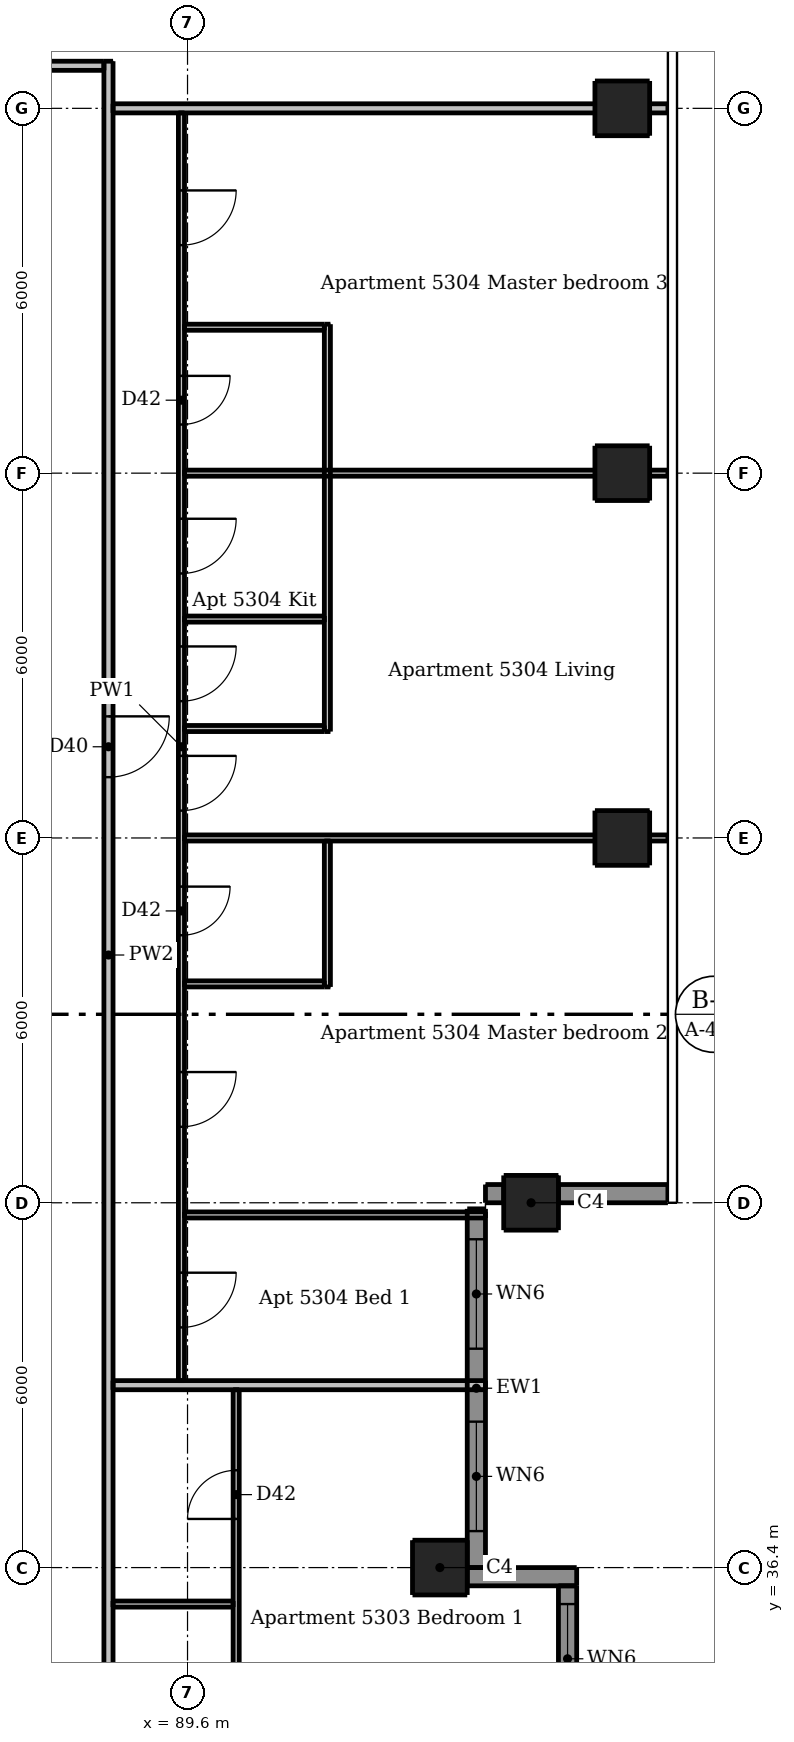
"""IFC4 building model, lengths in metres.
Left out: names, types, materials, properties, quantities, classifications, styles, units other than length and angle.
Written with IfcOpenShell. Run it as: python <this file> out.ifc"""

import sys

from ifc_helpers import new_model, si_unit, direction, frame, frame_2d, origin, origin_2d, place, context, subcontext, project, spatial, rectangle, extrude, element, fill, save


model = new_model("IFC4")
c1 = context("Model", 3, precision=1e-05, world=origin(), true_north=direction((0.0, 1.0)))
c2 = subcontext(c1, "Body", "Model", "MODEL_VIEW")
j1 = project(units=[si_unit("LENGTHUNIT", "METRE"), si_unit("PLANEANGLEUNIT", "RADIAN")], contexts=[c1])
p1 = place(None, origin())
s1 = spatial("IfcSite", under=j1, at=p1, CompositionType="ELEMENT")
p2 = place(p1, origin())
s2 = spatial("IfcBuilding", under=s1, at=p2, CompositionType="ELEMENT")
p3 = place(p2, frame((0.0, 0.0, 200.2)))
s3 = spatial("IfcBuildingStorey", under=s2, at=p3, CompositionType="ELEMENT", Elevation=200.2)
for number, where, z_axis, x_axis in (
    (1, (93.75, 36.4, 0.0), (0.0, 0.0, 1.0), (1.0, 0.0, 0.0)),
    (2, (95.25, 42.4, 0.0), (0.0, 0.0, 1.0), (1.0, 0.0, 0.0)),
    (3, (96.75, 48.4, 0.0), (0.0, 0.0, 1.0), (1.0, 0.0, 0.0)),
    (4, (96.75, 54.4, 0.0), (0.0, 0.0, 1.0), (1.0, 0.0, 0.0)),
    (5, (96.75, 60.4, 0.0), (0.0, 0.0, 1.0), (1.0, 0.0, 0.0)),
):
    element("IfcColumn", number, at=place(p3, frame(where, z_axis=z_axis, x_axis=x_axis)), inside=s3, PredefinedType="COLUMN", context=c2, shape_type="SweptSolid", body=[
        extrude(rectangle(XDim=0.9, YDim=0.9, at=origin_2d()), origin(), (0.0, 0.0, 1.0), 3.05),
    ])
p4 = place(p3, frame((96.0, 36.25, 0.0), z_axis=(0.0, 0.0, 1.0), x_axis=(-1.0, 0.0, 0.0)))
e6 = element("IfcWall", 6, at=p4, inside=s3, PredefinedType="SOLIDWALL", context=c2, shape_type="SweptSolid", body=[
    extrude(rectangle(XDim=1.8, YDim=0.3, at=frame_2d((0.9, 0.0))), origin(), (0.0, 0.0, 1.0), 3.05),
])
p5 = place(p3, frame((94.5, 42.55, 0.0), z_axis=(0.0, 0.0, 1.0), x_axis=(1.0, 0.0, 0.0)))
e7 = element("IfcWall", 7, at=p5, inside=s3, PredefinedType="SOLIDWALL", context=c2, shape_type="SweptSolid", body=[
    extrude(rectangle(XDim=0.3, YDim=0.3, at=frame_2d((0.15, 0.0))), origin(), (0.0, 0.0, 1.0), 3.05),
])
p6 = place(p3, frame((95.7, 42.55, 0.0), z_axis=(0.0, 0.0, 1.0), x_axis=(1.0, 0.0, 0.0)))
e8 = element("IfcWall", 8, at=p6, inside=s3, PredefinedType="SOLIDWALL", context=c2, shape_type="SweptSolid", body=[
    extrude(rectangle(XDim=1.8, YDim=0.3, at=frame_2d((0.9, 0.0))), origin(), (0.0, 0.0, 1.0), 3.05),
])
p7 = place(p3, frame((95.85, 30.1, 0.0), z_axis=(0.0, 0.0, 1.0), x_axis=(0.0, 1.0, 0.0)))
e9 = element("IfcWall", 9, at=p7, inside=s3, PredefinedType="SOLIDWALL", context=c2, shape_type="SweptSolid", body=[
    extrude(rectangle(XDim=6.0, YDim=0.3, at=frame_2d((3.0, 0.0))), origin(), (0.0, 0.0, 1.0), 3.05),
])
p8 = place(p7, frame((0.9, 0.0, 0.15)))
e10 = element("IfcOpeningElement", 10, at=p8, cuts=e9, PredefinedType="OPENING", context=c2, shape_type="SweptSolid", body=[
    extrude(rectangle(XDim=1.8, YDim=2.1, at=frame_2d((0.9, 1.05))), frame((0.0, 0.16, 0.0), z_axis=(0.0, -1.0, 0.0), x_axis=(1.0, 0.0, 0.0)), (0.0, 0.0, 1.0), 0.32),
])
p9 = place(p7, frame((3.9, 0.0, 0.15)))
e11 = element("IfcOpeningElement", 11, at=p9, cuts=e9, PredefinedType="OPENING", context=c2, shape_type="SweptSolid", body=[
    extrude(rectangle(XDim=1.8, YDim=2.1, at=frame_2d((0.9, 1.05))), frame((0.0, 0.16, 0.0), z_axis=(0.0, -1.0, 0.0), x_axis=(1.0, 0.0, 0.0)), (0.0, 0.0, 1.0), 0.32),
])
p10 = place(p3, frame((94.35, 36.4, 0.0), z_axis=(0.0, 0.0, 1.0), x_axis=(0.0, 1.0, 0.0)))
e12 = element("IfcWall", 12, at=p10, inside=s3, PredefinedType="SOLIDWALL", context=c2, shape_type="SweptSolid", body=[
    extrude(rectangle(XDim=5.9, YDim=0.3, at=frame_2d((2.95, 0.0))), origin(), (0.0, 0.0, 1.0), 3.05),
])
p11 = place(p10, frame((0.6, 0.0, 0.15)))
e13 = element("IfcOpeningElement", 13, at=p11, cuts=e12, PredefinedType="OPENING", context=c2, shape_type="SweptSolid", body=[
    extrude(rectangle(XDim=1.8, YDim=2.1, at=frame_2d((0.9, 1.05))), frame((0.0, 0.16, 0.0), z_axis=(0.0, -1.0, 0.0), x_axis=(1.0, 0.0, 0.0)), (0.0, 0.0, 1.0), 0.32),
])
p12 = place(p10, frame((3.6, 0.0, 0.15)))
e14 = element("IfcOpeningElement", 14, at=p12, cuts=e12, PredefinedType="OPENING", context=c2, shape_type="SweptSolid", body=[
    extrude(rectangle(XDim=1.8, YDim=2.1, at=frame_2d((0.9, 1.05))), frame((0.0, 0.16, 0.0), z_axis=(0.0, -1.0, 0.0), x_axis=(1.0, 0.0, 0.0)), (0.0, 0.0, 1.0), 0.32),
])
p13 = place(p3, frame((89.5, 60.325, 0.0), z_axis=(0.0, 0.0, 1.0), x_axis=(0.0, -1.0, 0.0)))
e15 = element("IfcWall", 15, at=p13, inside=s3, PredefinedType="PARTITIONING", context=c2, shape_type="SweptSolid", body=[
    extrude(rectangle(XDim=20.85, YDim=0.1, at=frame_2d((10.425, 0.0))), origin(), (0.0, 0.0, 1.0), 2.51),
])
p14 = place(p13, frame((10.575, 0.0, 0.0)))
e16 = element("IfcOpeningElement", 16, at=p14, cuts=e15, PredefinedType="OPENING", context=c2, shape_type="SweptSolid", body=[
    extrude(rectangle(XDim=0.9, YDim=2.1, at=frame_2d((0.45, 1.05))), frame((0.0, 0.06, 0.0), z_axis=(0.0, -1.0, 0.0), x_axis=(1.0, 0.0, 0.0)), (0.0, 0.0, 1.0), 0.12),
])
p15 = place(p13, frame((6.675, 0.0, 0.0)))
e17 = element("IfcOpeningElement", 17, at=p15, cuts=e15, PredefinedType="OPENING", context=c2, shape_type="SweptSolid", body=[
    extrude(rectangle(XDim=0.9, YDim=2.1, at=frame_2d((0.45, 1.05))), frame((0.0, 0.06, 0.0), z_axis=(0.0, -1.0, 0.0), x_axis=(1.0, 0.0, 0.0)), (0.0, 0.0, 1.0), 0.12),
])
p16 = place(p13, frame((8.775, 0.0, 0.0)))
e18 = element("IfcOpeningElement", 18, at=p16, cuts=e15, PredefinedType="OPENING", context=c2, shape_type="SweptSolid", body=[
    extrude(rectangle(XDim=0.9, YDim=2.1, at=frame_2d((0.45, 1.05))), frame((0.0, 0.06, 0.0), z_axis=(0.0, -1.0, 0.0), x_axis=(1.0, 0.0, 0.0)), (0.0, 0.0, 1.0), 0.12),
])
p17 = place(p13, frame((19.075, 0.0, 0.0)))
e19 = element("IfcOpeningElement", 19, at=p17, cuts=e15, PredefinedType="OPENING", context=c2, shape_type="SweptSolid", body=[
    extrude(rectangle(XDim=0.9, YDim=2.1, at=frame_2d((0.45, 1.05))), frame((0.0, 0.06, 0.0), z_axis=(0.0, -1.0, 0.0), x_axis=(1.0, 0.0, 0.0)), (0.0, 0.0, 1.0), 0.12),
])
p18 = place(p13, frame((15.775, 0.0, 0.0)))
e20 = element("IfcOpeningElement", 20, at=p18, cuts=e15, PredefinedType="OPENING", context=c2, shape_type="SweptSolid", body=[
    extrude(rectangle(XDim=0.9, YDim=2.1, at=frame_2d((0.45, 1.05))), frame((0.0, 0.06, 0.0), z_axis=(0.0, -1.0, 0.0), x_axis=(1.0, 0.0, 0.0)), (0.0, 0.0, 1.0), 0.12),
])
p19 = place(p13, frame((1.275, 0.0, 0.0)))
e21 = element("IfcOpeningElement", 21, at=p19, cuts=e15, PredefinedType="OPENING", context=c2, shape_type="SweptSolid", body=[
    extrude(rectangle(XDim=0.9, YDim=2.1, at=frame_2d((0.45, 1.05))), frame((0.0, 0.06, 0.0), z_axis=(0.0, -1.0, 0.0), x_axis=(1.0, 0.0, 0.0)), (0.0, 0.0, 1.0), 0.12),
])
p20 = place(p13, frame((12.725, 0.0, 0.0)))
e22 = element("IfcOpeningElement", 22, at=p20, cuts=e15, PredefinedType="OPENING", context=c2, shape_type="SweptSolid", body=[
    extrude(rectangle(XDim=0.8, YDim=2.1, at=frame_2d((0.4, 1.05))), frame((0.0, 0.06, 0.0), z_axis=(0.0, -1.0, 0.0), x_axis=(1.0, 0.0, 0.0)), (0.0, 0.0, 1.0), 0.12),
])
p21 = place(p13, frame((4.325, 0.0, 0.0)))
e23 = element("IfcOpeningElement", 23, at=p21, cuts=e15, PredefinedType="OPENING", context=c2, shape_type="SweptSolid", body=[
    extrude(rectangle(XDim=0.8, YDim=2.1, at=frame_2d((0.4, 1.05))), frame((0.0, 0.06, 0.0), z_axis=(0.0, -1.0, 0.0), x_axis=(1.0, 0.0, 0.0)), (0.0, 0.0, 1.0), 0.12),
])
p22 = place(p3, frame((90.4, 33.45, 0.0), z_axis=(0.0, 0.0, 1.0), x_axis=(0.0, 1.0, 0.0)))
e24 = element("IfcWall", 24, at=p22, inside=s3, PredefinedType="PARTITIONING", context=c2, shape_type="SweptSolid", body=[
    extrude(rectangle(XDim=5.875, YDim=0.1, at=frame_2d((2.938, 0.0))), origin(), (0.0, 0.0, 1.0), 3.05),
])
p23 = place(p22, frame((3.75, 0.0, 0.0)))
e25 = element("IfcOpeningElement", 25, at=p23, cuts=e24, PredefinedType="OPENING", context=c2, shape_type="SweptSolid", body=[
    extrude(rectangle(XDim=0.8, YDim=2.1, at=frame_2d((0.4, 1.05))), frame((0.0, 0.06, 0.0), z_axis=(0.0, -1.0, 0.0), x_axis=(1.0, 0.0, 0.0)), (0.0, 0.0, 1.0), 0.12),
])
p24 = place(p3, frame((91.9, 45.95, 0.0), z_axis=(0.0, 0.0, 1.0), x_axis=(0.0, 1.0, 0.0)))
e26 = element("IfcWall", 26, at=p24, inside=s3, PredefinedType="PARTITIONING", context=c2, shape_type="SweptSolid", body=[
    extrude(rectangle(XDim=2.4, YDim=0.1, at=frame_2d((1.2, 0.0))), origin(), (0.0, 0.0, 1.0), 3.05),
])
p25 = place(p3, frame((91.9, 50.15, 0.0), z_axis=(0.0, 0.0, 1.0), x_axis=(0.0, 1.0, 0.0)))
e27 = element("IfcWall", 27, at=p25, inside=s3, PredefinedType="PARTITIONING", context=c2, shape_type="SweptSolid", body=[
    extrude(rectangle(XDim=6.7, YDim=0.1, at=frame_2d((3.35, 0.0))), origin(), (0.0, 0.0, 1.0), 3.05),
])
p26 = place(p3, frame((89.55, 56.8, 0.0), z_axis=(0.0, 0.0, 1.0), x_axis=(1.0, 0.0, 0.0)))
e28 = element("IfcWall", 28, at=p26, inside=s3, PredefinedType="PARTITIONING", context=c2, shape_type="SweptSolid", body=[
    extrude(rectangle(XDim=2.3, YDim=0.1, at=frame_2d((1.15, 0.0))), origin(), (0.0, 0.0, 1.0), 3.05),
])
p27 = place(p3, frame((89.55, 54.4, 0.0), z_axis=(0.0, 0.0, 1.0), x_axis=(1.0, 0.0, 0.0)))
e29 = element("IfcWall", 29, at=p27, inside=s3, PredefinedType="PARTITIONING", context=c2, shape_type="SweptSolid", body=[
    extrude(rectangle(XDim=7.95, YDim=0.1, at=frame_2d((3.975, 0.0))), origin(), (0.0, 0.0, 1.0), 2.516),
])
for number, where, z_axis, x_axis in (
    (30, (89.55, 52.0, 0.0), (0.0, 0.0, 1.0), (1.0, 0.0, 0.0)),
    (31, (89.55, 50.2, 0.0), (0.0, 0.0, 1.0), (1.0, 0.0, 0.0)),
):
    element("IfcWall", number, at=place(p3, frame(where, z_axis=z_axis, x_axis=x_axis)), inside=s3, PredefinedType="PARTITIONING", context=c2, shape_type="SweptSolid", body=[
        extrude(rectangle(XDim=2.3, YDim=0.1, at=frame_2d((1.15, 0.0))), origin(), (0.0, 0.0, 1.0), 3.05),
    ])
p28 = place(p3, frame((89.55, 48.4, 0.0), z_axis=(0.0, 0.0, 1.0), x_axis=(1.0, 0.0, 0.0)))
e32 = element("IfcWall", 32, at=p28, inside=s3, PredefinedType="PARTITIONING", context=c2, shape_type="SweptSolid", body=[
    extrude(rectangle(XDim=7.95, YDim=0.1, at=frame_2d((3.975, 0.0))), origin(), (0.0, 0.0, 1.0), 2.516),
])
p29 = place(p3, frame((89.55, 46.0, 0.0), z_axis=(0.0, 0.0, 1.0), x_axis=(1.0, 0.0, 0.0)))
e33 = element("IfcWall", 33, at=p29, inside=s3, PredefinedType="PARTITIONING", context=c2, shape_type="SweptSolid", body=[
    extrude(rectangle(XDim=2.3, YDim=0.1, at=frame_2d((1.15, 0.0))), origin(), (0.0, 0.0, 1.0), 3.05),
])
p30 = place(p3, frame((89.55, 42.2, 0.0), z_axis=(0.0, 0.0, 1.0), x_axis=(1.0, 0.0, 0.0)))
e34 = element("IfcWall", 34, at=p30, inside=s3, PredefinedType="PARTITIONING", context=c2, shape_type="SweptSolid", body=[
    extrude(rectangle(XDim=4.95, YDim=0.1, at=frame_2d((2.475, 0.0))), origin(), (0.0, 0.0, 1.0), 3.05),
])
p31 = place(p3, frame((88.375, 35.8, 0.0), z_axis=(0.0, 0.0, 1.0), x_axis=(1.0, 0.0, 0.0)))
e35 = element("IfcWall", 35, at=p31, inside=s3, PredefinedType="PARTITIONING", context=c2, shape_type="SweptSolid", body=[
    extrude(rectangle(XDim=1.975, YDim=0.1, at=frame_2d((0.988, 0.0))), origin(), (0.0, 0.0, 1.0), 3.05),
])
p32 = place(p3, frame((88.3, 61.175, 0.0), z_axis=(0.0, 0.0, 1.0), x_axis=(0.0, -1.0, 0.0)))
e36 = element("IfcWall", 36, at=p32, inside=s3, PredefinedType="PARTITIONING", context=c2, shape_type="SweptSolid", body=[
    extrude(rectangle(XDim=29.4, YDim=0.15, at=frame_2d((14.7, 0.0))), origin(), (0.0, 0.0, 1.0), 3.05),
])
p33 = place(p32, frame((28.125, 0.0, 0.0)))
e37 = element("IfcOpeningElement", 37, at=p33, cuts=e36, PredefinedType="OPENING", context=c2, shape_type="SweptSolid", body=[
    extrude(rectangle(XDim=1.0, YDim=2.1, at=frame_2d((0.5, 1.05))), frame((0.0, 0.085, 0.0), z_axis=(0.0, -1.0, 0.0), x_axis=(1.0, 0.0, 0.0)), (0.0, 0.0, 1.0), 0.17),
])
p34 = place(p32, frame((10.775, 0.0, 0.0)))
e38 = element("IfcOpeningElement", 38, at=p34, cuts=e36, PredefinedType="OPENING", context=c2, shape_type="SweptSolid", body=[
    extrude(rectangle(XDim=1.0, YDim=2.1, at=frame_2d((0.5, 1.05))), frame((0.0, 0.085, 0.0), z_axis=(0.0, -1.0, 0.0), x_axis=(1.0, 0.0, 0.0)), (0.0, 0.0, 1.0), 0.17),
])
p35 = place(p3, frame((58.975, 61.1, 0.0), z_axis=(0.0, 0.0, 1.0), x_axis=(1.0, 0.0, 0.0)))
e39 = element("IfcWall", 39, at=p35, inside=s3, PredefinedType="PARTITIONING", context=c2, shape_type="SweptSolid", body=[
    extrude(rectangle(XDim=29.25, YDim=0.15, at=frame_2d((14.625, 0.0))), origin(), (0.0, 0.0, 1.0), 3.05),
])
p36 = place(p35, frame((7.925, 0.0, 0.0)))
e40 = element("IfcOpeningElement", 40, at=p36, cuts=e39, PredefinedType="OPENING", context=c2, shape_type="SweptSolid", body=[
    extrude(rectangle(XDim=1.0, YDim=2.1, at=frame_2d((0.5, 1.05))), frame((0.0, 0.085, 0.0), z_axis=(0.0, -1.0, 0.0), x_axis=(1.0, 0.0, 0.0)), (0.0, 0.0, 1.0), 0.17),
])
p37 = place(p35, frame((26.475, 0.0, 0.0)))
e41 = element("IfcOpeningElement", 41, at=p37, cuts=e39, PredefinedType="OPENING", context=c2, shape_type="SweptSolid", body=[
    extrude(rectangle(XDim=1.0, YDim=2.1, at=frame_2d((0.5, 1.05))), frame((0.0, 0.085, 0.0), z_axis=(0.0, -1.0, 0.0), x_axis=(1.0, 0.0, 0.0)), (0.0, 0.0, 1.0), 0.17),
])
p38 = place(p3, frame((88.375, 60.4, 0.0), z_axis=(0.0, 0.0, 1.0), x_axis=(1.0, 0.0, 0.0)))
e42 = element("IfcWall", 42, at=p38, inside=s3, PredefinedType="PARTITIONING", context=c2, shape_type="SweptSolid", body=[
    extrude(rectangle(XDim=9.125, YDim=0.15, at=frame_2d((4.562, 0.0))), origin(), (0.0, 0.0, 1.0), 2.59),
])
p39 = place(p3, frame((88.375, 39.4, 0.0), z_axis=(0.0, 0.0, 1.0), x_axis=(1.0, 0.0, 0.0)))
e43 = element("IfcWall", 43, at=p39, inside=s3, PredefinedType="PARTITIONING", context=c2, shape_type="SweptSolid", body=[
    extrude(rectangle(XDim=6.125, YDim=0.15, at=frame_2d((3.062, 0.0))), origin(), (0.0, 0.0, 1.0), 3.05),
])
p40 = place(p9, origin())
e44 = element("IfcWindow", 44, at=p40, inside=s3, PartitioningType="DOUBLE_PANEL_VERTICAL", PredefinedType="WINDOW", context=c2, shape_type="SweptSolid", body=[
    extrude(rectangle(XDim=1.8, YDim=2.1, at=frame_2d((0.9, 1.05))), frame((0.0, 0.03, 0.0), z_axis=(0.0, -1.0, 0.0), x_axis=(1.0, 0.0, 0.0)), (0.0, 0.0, 1.0), 0.06),
])
fill(e11, e44)
p41 = place(p11, origin())
e45 = element("IfcWindow", 45, at=p41, inside=s3, PartitioningType="DOUBLE_PANEL_VERTICAL", PredefinedType="WINDOW", context=c2, shape_type="SweptSolid", body=[
    extrude(rectangle(XDim=1.8, YDim=2.1, at=frame_2d((0.9, 1.05))), frame((0.0, 0.03, 0.0), z_axis=(0.0, -1.0, 0.0), x_axis=(1.0, 0.0, 0.0)), (0.0, 0.0, 1.0), 0.06),
])
fill(e13, e45)
p42 = place(p12, origin())
e46 = element("IfcWindow", 46, at=p42, inside=s3, PartitioningType="DOUBLE_PANEL_VERTICAL", PredefinedType="WINDOW", context=c2, shape_type="SweptSolid", body=[
    extrude(rectangle(XDim=1.8, YDim=2.1, at=frame_2d((0.9, 1.05))), frame((0.0, 0.03, 0.0), z_axis=(0.0, -1.0, 0.0), x_axis=(1.0, 0.0, 0.0)), (0.0, 0.0, 1.0), 0.06),
])
fill(e14, e46)
p43 = place(p23, origin())
e47 = element("IfcDoor", 47, at=p43, inside=s3, OperationType="SINGLE_SWING_LEFT", PredefinedType="DOOR", context=c2, shape_type="SweptSolid", body=[
    extrude(rectangle(XDim=0.8, YDim=2.1, at=frame_2d((0.4, 1.05))), frame((0.0, 0.025, 0.0), z_axis=(0.0, -1.0, 0.0), x_axis=(1.0, 0.0, 0.0)), (0.0, 0.0, 1.0), 0.05),
])
fill(e25, e47)
p44 = place(p34, origin())
e48 = element("IfcDoor", 48, at=p44, inside=s3, OperationType="SINGLE_SWING_LEFT", PredefinedType="DOOR", context=c2, shape_type="SweptSolid", body=[
    extrude(rectangle(XDim=1.0, YDim=2.1, at=frame_2d((0.5, 1.05))), frame((0.0, 0.025, 0.0), z_axis=(0.0, -1.0, 0.0), x_axis=(1.0, 0.0, 0.0)), (0.0, 0.0, 1.0), 0.05),
])
fill(e38, e48)
p45 = place(p14, origin())
e49 = element("IfcDoor", 49, at=p45, inside=s3, OperationType="SINGLE_SWING_LEFT", PredefinedType="DOOR", context=c2, shape_type="SweptSolid", body=[
    extrude(rectangle(XDim=0.9, YDim=2.1, at=frame_2d((0.45, 1.05))), frame((0.0, 0.025, 0.0), z_axis=(0.0, -1.0, 0.0), x_axis=(1.0, 0.0, 0.0)), (0.0, 0.0, 1.0), 0.05),
])
fill(e16, e49)
p46 = place(p15, origin())
e50 = element("IfcDoor", 50, at=p46, inside=s3, OperationType="SINGLE_SWING_LEFT", PredefinedType="DOOR", context=c2, shape_type="SweptSolid", body=[
    extrude(rectangle(XDim=0.9, YDim=2.1, at=frame_2d((0.45, 1.05))), frame((0.0, 0.025, 0.0), z_axis=(0.0, -1.0, 0.0), x_axis=(1.0, 0.0, 0.0)), (0.0, 0.0, 1.0), 0.05),
])
fill(e17, e50)
p47 = place(p16, origin())
e51 = element("IfcDoor", 51, at=p47, inside=s3, OperationType="SINGLE_SWING_LEFT", PredefinedType="DOOR", context=c2, shape_type="SweptSolid", body=[
    extrude(rectangle(XDim=0.9, YDim=2.1, at=frame_2d((0.45, 1.05))), frame((0.0, 0.025, 0.0), z_axis=(0.0, -1.0, 0.0), x_axis=(1.0, 0.0, 0.0)), (0.0, 0.0, 1.0), 0.05),
])
fill(e18, e51)
p48 = place(p17, origin())
e52 = element("IfcDoor", 52, at=p48, inside=s3, OperationType="SINGLE_SWING_LEFT", PredefinedType="DOOR", context=c2, shape_type="SweptSolid", body=[
    extrude(rectangle(XDim=0.9, YDim=2.1, at=frame_2d((0.45, 1.05))), frame((0.0, 0.025, 0.0), z_axis=(0.0, -1.0, 0.0), x_axis=(1.0, 0.0, 0.0)), (0.0, 0.0, 1.0), 0.05),
])
fill(e19, e52)
p49 = place(p18, origin())
e53 = element("IfcDoor", 53, at=p49, inside=s3, OperationType="SINGLE_SWING_LEFT", PredefinedType="DOOR", context=c2, shape_type="SweptSolid", body=[
    extrude(rectangle(XDim=0.9, YDim=2.1, at=frame_2d((0.45, 1.05))), frame((0.0, 0.025, 0.0), z_axis=(0.0, -1.0, 0.0), x_axis=(1.0, 0.0, 0.0)), (0.0, 0.0, 1.0), 0.05),
])
fill(e20, e53)
p50 = place(p19, origin())
e54 = element("IfcDoor", 54, at=p50, inside=s3, OperationType="SINGLE_SWING_LEFT", PredefinedType="DOOR", context=c2, shape_type="SweptSolid", body=[
    extrude(rectangle(XDim=0.9, YDim=2.1, at=frame_2d((0.45, 1.05))), frame((0.0, 0.025, 0.0), z_axis=(0.0, -1.0, 0.0), x_axis=(1.0, 0.0, 0.0)), (0.0, 0.0, 1.0), 0.05),
])
fill(e21, e54)
p51 = place(p20, origin())
e55 = element("IfcDoor", 55, at=p51, inside=s3, OperationType="SINGLE_SWING_LEFT", PredefinedType="DOOR", context=c2, shape_type="SweptSolid", body=[
    extrude(rectangle(XDim=0.8, YDim=2.1, at=frame_2d((0.4, 1.05))), frame((0.0, 0.025, 0.0), z_axis=(0.0, -1.0, 0.0), x_axis=(1.0, 0.0, 0.0)), (0.0, 0.0, 1.0), 0.05),
])
fill(e22, e55)
p52 = place(p21, origin())
e56 = element("IfcDoor", 56, at=p52, inside=s3, OperationType="SINGLE_SWING_LEFT", PredefinedType="DOOR", context=c2, shape_type="SweptSolid", body=[
    extrude(rectangle(XDim=0.8, YDim=2.1, at=frame_2d((0.4, 1.05))), frame((0.0, 0.025, 0.0), z_axis=(0.0, -1.0, 0.0), x_axis=(1.0, 0.0, 0.0)), (0.0, 0.0, 1.0), 0.05),
])
fill(e23, e56)
save(model, sys.argv[1])
